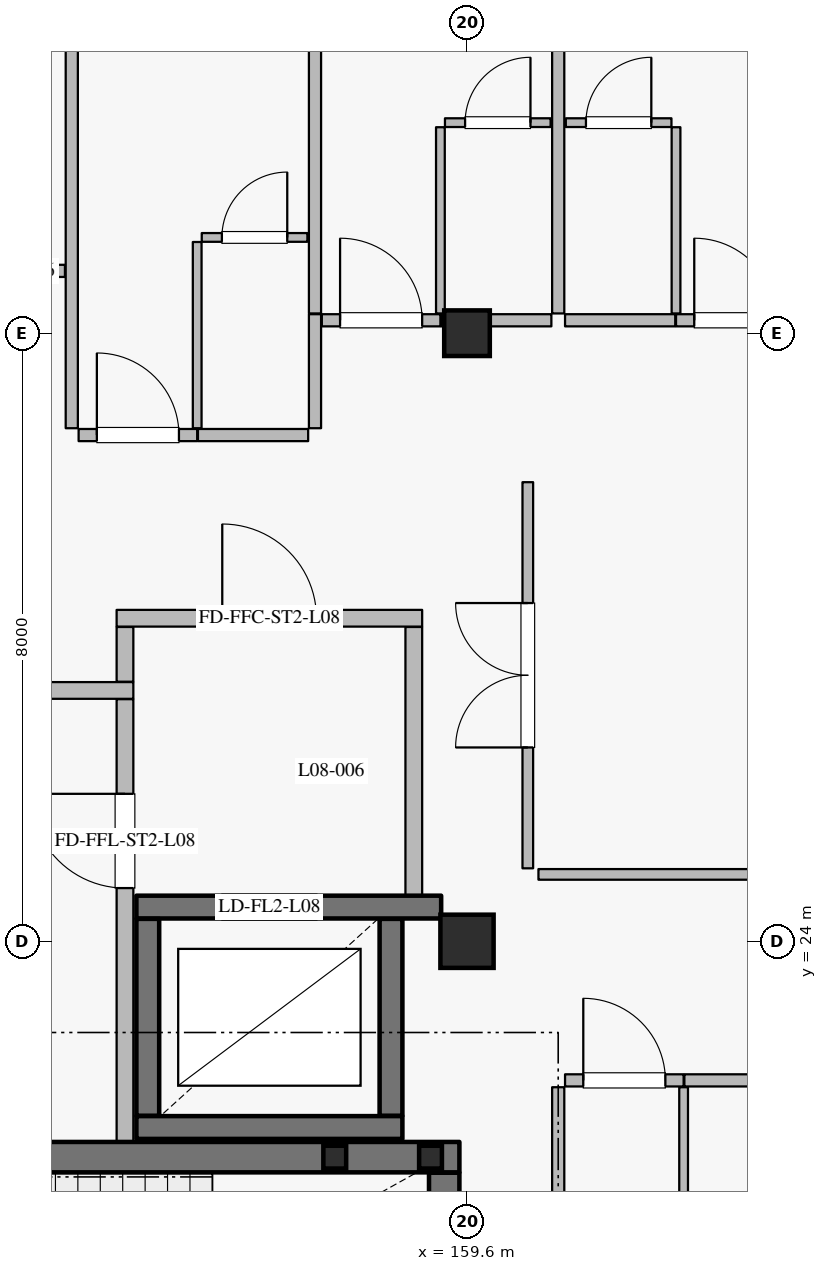
"""IFC4 building model, lengths in metres.
Left out: names, types, materials, properties, quantities, classifications, styles, units other than length and angle.
Written with IfcOpenShell. Run it as: python <this file> out.ifc"""

import sys

from ifc_helpers import new_model, si_unit, direction, frame, frame_2d, origin, origin_2d, place, context, subcontext, project, spatial, rectangle, hollow_rectangle, extrude, element, fill, save


model = new_model("IFC4")
c1 = context("Model", 3, precision=1e-05, world=origin(), true_north=direction((0.0, 1.0)))
c2 = subcontext(c1, "Body", "Model", "MODEL_VIEW")
j1 = project(units=[si_unit("LENGTHUNIT", "METRE"), si_unit("PLANEANGLEUNIT", "RADIAN")], contexts=[c1])
p1 = place(None, origin())
s1 = spatial("IfcSite", under=j1, at=p1, CompositionType="ELEMENT")
p2 = place(p1, origin())
s2 = spatial("IfcBuilding", under=s1, at=p2, CompositionType="ELEMENT")
p3 = place(p2, frame((0.0, 0.0, 36.0)))
s3 = spatial("IfcBuildingStorey", under=s2, at=p3, CompositionType="ELEMENT", Elevation=36.0)
p4 = place(p3, frame((159.6, 24.0, 0.0), z_axis=(0.0, 0.0, 1.0), x_axis=(1.0, 0.0, 0.0)))
e1 = element("IfcColumn", 1, at=p4, inside=s3, PredefinedType="COLUMN", context=c2, shape_type="SweptSolid", body=[
    extrude(rectangle(XDim=0.7, YDim=0.7, at=origin_2d()), origin(), (0.0, 0.0, 1.0), 3.6),
])
p5 = place(p3, frame((159.6, 32.0, 0.0), z_axis=(0.0, 0.0, 1.0), x_axis=(1.0, 0.0, 0.0)))
e2 = element("IfcColumn", 2, at=p5, inside=s3, PredefinedType="COLUMN", context=c2, shape_type="SweptSolid", body=[
    extrude(rectangle(XDim=0.6, YDim=0.6, at=origin_2d()), origin(), (0.0, 0.0, 1.0), 3.6),
])
p6 = place(p3, frame((155.25, 21.55, 0.0), z_axis=(0.0, 0.0, 1.0), x_axis=(1.0, 0.0, 0.0)))
e3 = element("IfcWall", 3, at=p6, inside=s3, PredefinedType="SHEAR", context=c2, shape_type="SweptSolid", body=[
    extrude(rectangle(XDim=3.5, YDim=0.3, at=frame_2d((1.75, 0.0))), origin(), (0.0, 0.0, 1.0), 3.365),
])
p7 = place(p3, frame((158.6, 21.705, 0.0), z_axis=(0.0, 0.0, 1.0), x_axis=(0.0, 1.0, 0.0)))
e4 = element("IfcWall", 4, at=p7, inside=s3, PredefinedType="SHEAR", context=c2, shape_type="SweptSolid", body=[
    extrude(rectangle(XDim=2.59, YDim=0.3, at=frame_2d((1.295, 0.0))), origin(), (0.0, 0.0, 1.0), 3.365),
])
p8 = place(p3, frame((159.26, 24.45, 0.0), z_axis=(0.0, 0.0, 1.0), x_axis=(-1.0, 0.0, 0.0)))
e5 = element("IfcWall", 5, at=p8, inside=s3, PredefinedType="SHEAR", context=c2, shape_type="SweptSolid", body=[
    extrude(rectangle(XDim=4.01, YDim=0.3, at=frame_2d((2.005, 0.0))), origin(), (0.0, 0.0, 1.0), 3.365),
])
p9 = place(p8, frame((1.635, 0.0, 0.0)))
e6 = element("IfcOpeningElement", 6, at=p9, cuts=e5, PredefinedType="OPENING", context=c2, shape_type="SweptSolid", body=[
    extrude(rectangle(XDim=1.25, YDim=2.25, at=frame_2d((0.625, 1.125))), frame((0.0, 0.16, 0.0), z_axis=(0.0, -1.0, 0.0), x_axis=(1.0, 0.0, 0.0)), (0.0, 0.0, 1.0), 0.32),
])
p10 = place(p3, frame((155.4, 24.295, 0.0), z_axis=(0.0, 0.0, 1.0), x_axis=(0.0, -1.0, 0.0)))
e7 = element("IfcWall", 7, at=p10, inside=s3, PredefinedType="SHEAR", context=c2, shape_type="SweptSolid", body=[
    extrude(rectangle(XDim=2.59, YDim=0.3, at=frame_2d((1.295, 0.0))), origin(), (0.0, 0.0, 1.0), 3.365),
])
p11 = place(p3, frame((159.3, 17.005, 0.0), z_axis=(0.0, 0.0, 1.0), x_axis=(0.0, 1.0, 0.0)))
e8 = element("IfcWall", 8, at=p11, inside=s3, PredefinedType="SHEAR", context=c2, shape_type="SweptSolid", body=[
    extrude(rectangle(XDim=3.95, YDim=0.4, at=frame_2d((1.975, 0.0))), origin(), (0.0, 0.0, 1.0), 3.365),
])
p12 = place(p3, frame((151.3, 21.16, 0.0), z_axis=(0.0, 0.0, 1.0), x_axis=(1.0, 0.0, 0.0)))
e9 = element("IfcWall", 9, at=p12, inside=s3, PredefinedType="SHEAR", context=c2, shape_type="SweptSolid", body=[
    extrude(rectangle(XDim=8.2, YDim=0.4, at=frame_2d((4.1, 0.0))), origin(), (0.0, 0.0, 1.0), 3.365),
])
p13 = place(p12, frame((0.43, 0.0, 0.0)))
e10 = element("IfcOpeningElement", 10, at=p13, cuts=e9, PredefinedType="OPENING", context=c2, shape_type="SweptSolid", body=[
    extrude(rectangle(XDim=1.16, YDim=2.2, at=frame_2d((0.58, 1.1))), frame((0.0, 0.21, 0.0), z_axis=(0.0, -1.0, 0.0), x_axis=(1.0, 0.0, 0.0)), (0.0, 0.0, 1.0), 0.42),
])
p14 = place(p3, frame((151.39, 27.3, 0.0), z_axis=(0.0, 0.0, 1.0), x_axis=(1.0, 0.0, 0.0)))
e11 = element("IfcWall", 11, at=p14, inside=s3, PredefinedType="PARTITIONING", context=c2, shape_type="SweptSolid", body=[
    extrude(rectangle(XDim=3.82, YDim=0.22, at=frame_2d((1.91, 0.0))), origin(), (0.0, 0.0, 1.0), 3.365),
])
p15 = place(p14, frame((1.35, 0.0, 0.0)))
e12 = element("IfcOpeningElement", 12, at=p15, cuts=e11, PredefinedType="OPENING", context=c2, shape_type="SweptSolid", body=[
    extrude(rectangle(XDim=1.12, YDim=2.2, at=frame_2d((0.56, 1.1))), frame((0.0, 0.12, 0.0), z_axis=(0.0, -1.0, 0.0), x_axis=(1.0, 0.0, 0.0)), (0.0, 0.0, 1.0), 0.24),
])
p16 = place(p3, frame((155.1, 21.365, 0.0), z_axis=(0.0, 0.0, 1.0), x_axis=(0.0, 1.0, 0.0)))
e13 = element("IfcWall", 13, at=p16, inside=s3, PredefinedType="PARTITIONING", context=c2, shape_type="SweptSolid", body=[
    extrude(rectangle(XDim=5.82, YDim=0.22, at=frame_2d((2.91, 0.0))), origin(), (0.0, 0.0, 1.0), 3.365),
])
p17 = place(p16, frame((3.335, 0.0, 0.0)))
e14 = element("IfcOpeningElement", 14, at=p17, cuts=e13, PredefinedType="OPENING", context=c2, shape_type="SweptSolid", body=[
    extrude(rectangle(XDim=1.24, YDim=2.2, at=frame_2d((0.62, 1.1))), frame((0.0, 0.12, 0.0), z_axis=(0.0, -1.0, 0.0), x_axis=(1.0, 0.0, 0.0)), (0.0, 0.0, 1.0), 0.24),
])
p18 = place(p3, frame((155.1, 27.415, 0.0), z_axis=(0.0, 0.0, 1.0), x_axis=(0.0, 1.0, 0.0)))
e15 = element("IfcWall", 15, at=p18, inside=s3, PredefinedType="PARTITIONING", context=c2, shape_type="SweptSolid", body=[
    extrude(rectangle(XDim=0.72, YDim=0.22, at=frame_2d((0.36, 0.0))), origin(), (0.0, 0.0, 1.0), 3.365),
])
p19 = place(p3, frame((158.9, 24.605, 0.0), z_axis=(0.0, 0.0, 1.0), x_axis=(0.0, 1.0, 0.0)))
e16 = element("IfcWall", 16, at=p19, inside=s3, PredefinedType="PARTITIONING", context=c2, shape_type="SweptSolid", body=[
    extrude(rectangle(XDim=3.53, YDim=0.22, at=frame_2d((1.765, 0.0))), origin(), (0.0, 0.0, 1.0), 3.365),
])
p20 = place(p3, frame((154.99, 28.25, 0.0), z_axis=(0.0, 0.0, 1.0), x_axis=(1.0, 0.0, 0.0)))
e17 = element("IfcWall", 17, at=p20, inside=s3, PredefinedType="PARTITIONING", context=c2, shape_type="SweptSolid", body=[
    extrude(rectangle(XDim=4.02, YDim=0.22, at=frame_2d((2.01, 0.0))), origin(), (0.0, 0.0, 1.0), 3.365),
])
p21 = place(p20, frame((1.39, 0.0, 0.0)))
e18 = element("IfcOpeningElement", 18, at=p21, cuts=e17, PredefinedType="OPENING", context=c2, shape_type="SweptSolid", body=[
    extrude(rectangle(XDim=1.24, YDim=2.2, at=frame_2d((0.62, 1.1))), frame((0.0, 0.12, 0.0), z_axis=(0.0, -1.0, 0.0), x_axis=(1.0, 0.0, 0.0)), (0.0, 0.0, 1.0), 0.24),
])
for number, where, z_axis, x_axis in (
    (19, (157.86, 21.16, -1.8), (0.0, 0.0, 1.0), (1.0, 0.0, 0.0)),
    (20, (159.12, 21.16, -1.8), (0.0, 0.0, 1.0), (1.0, 0.0, 0.0)),
):
    element("IfcColumn", number, at=place(p3, frame(where, z_axis=z_axis, x_axis=x_axis)), inside=s3, PredefinedType="COLUMN", context=c2, shape_type="SweptSolid", body=[
        extrude(hollow_rectangle(XDim=0.3, YDim=0.3, WallThickness=0.012, at=origin_2d()), origin(), (0.0, 0.0, 1.0), 3.42),
    ])
p22 = place(p3, frame((152.75, 32.82, 0.0), z_axis=(0.0, 0.0, 1.0), x_axis=(1.0, 0.0, 0.0)))
e21 = element("IfcWall", 21, at=p22, inside=s3, PredefinedType="PARTITIONING", context=c2, shape_type="SweptSolid", body=[
    extrude(rectangle(XDim=1.56, YDim=0.16, at=frame_2d((0.78, 0.0))), origin(), (0.0, 0.0, 1.0), 3.365),
])
p23 = place(p22, frame((0.24, 0.0, 0.0)))
e22 = element("IfcOpeningElement", 22, at=p23, cuts=e21, PredefinedType="OPENING", context=c2, shape_type="SweptSolid", body=[
    extrude(rectangle(XDim=1.08, YDim=2.3, at=frame_2d((0.54, 1.15))), frame((0.0, 0.09, 0.0), z_axis=(0.0, -1.0, 0.0), x_axis=(1.0, 0.0, 0.0)), (0.0, 0.0, 1.0), 0.18),
])
p24 = place(p3, frame((154.49, 30.66, 0.0), z_axis=(0.0, 0.0, 1.0), x_axis=(1.0, 0.0, 0.0)))
e23 = element("IfcWall", 23, at=p24, inside=s3, PredefinedType="PARTITIONING", context=c2, shape_type="SweptSolid", body=[
    extrude(rectangle(XDim=1.56, YDim=0.16, at=frame_2d((0.78, 0.0))), origin(), (0.0, 0.0, 1.0), 3.365),
])
p25 = place(p24, frame((0.24, 0.0, 0.0)))
e24 = element("IfcOpeningElement", 24, at=p25, cuts=e23, PredefinedType="OPENING", context=c2, shape_type="SweptSolid", body=[
    extrude(rectangle(XDim=1.08, YDim=2.3, at=frame_2d((0.54, 1.15))), frame((0.0, 0.09, 0.0), z_axis=(0.0, -1.0, 0.0), x_axis=(1.0, 0.0, 0.0)), (0.0, 0.0, 1.0), 0.18),
])
p26 = place(p3, frame((156.06, 30.66, 0.0), z_axis=(0.0, 0.0, 1.0), x_axis=(1.0, 0.0, 0.0)))
e25 = element("IfcWall", 25, at=p26, inside=s3, PredefinedType="PARTITIONING", context=c2, shape_type="SweptSolid", body=[
    extrude(rectangle(XDim=1.45, YDim=0.16, at=frame_2d((0.725, 0.0))), origin(), (0.0, 0.0, 1.0), 3.365),
])
p27 = place(p3, frame((156.05, 30.75, 0.0), z_axis=(0.0, 0.0, 1.0), x_axis=(0.0, 1.0, 0.0)))
e26 = element("IfcWall", 26, at=p27, inside=s3, PredefinedType="PARTITIONING", context=c2, shape_type="SweptSolid", body=[
    extrude(rectangle(XDim=2.45, YDim=0.115, at=frame_2d((1.225, 0.0))), origin(), (0.0, 0.0, 1.0), 3.365),
])
p28 = place(p3, frame((156.11, 33.26, 0.0), z_axis=(0.0, 0.0, 1.0), x_axis=(1.0, 0.0, 0.0)))
e27 = element("IfcWall", 27, at=p28, inside=s3, PredefinedType="PARTITIONING", context=c2, shape_type="SweptSolid", body=[
    extrude(rectangle(XDim=1.39, YDim=0.115, at=frame_2d((0.695, 0.0))), origin(), (0.0, 0.0, 1.0), 3.365),
])
p29 = place(p28, frame((0.265, 0.0, 0.0)))
e28 = element("IfcOpeningElement", 28, at=p29, cuts=e27, PredefinedType="OPENING", context=c2, shape_type="SweptSolid", body=[
    extrude(rectangle(XDim=0.86, YDim=2.12, at=frame_2d((0.43, 1.06))), frame((0.0, 0.067, 0.0), z_axis=(0.0, -1.0, 0.0), x_axis=(1.0, 0.0, 0.0)), (0.0, 0.0, 1.0), 0.135),
])
p30 = place(p3, frame((154.4, 30.75, 0.0), z_axis=(0.0, 0.0, 1.0), x_axis=(0.0, 1.0, 0.0)))
e29 = element("IfcWall", 29, at=p30, inside=s3, PredefinedType="PARTITIONING", context=c2, shape_type="SweptSolid", body=[
    extrude(rectangle(XDim=8.91, YDim=0.16, at=frame_2d((4.455, 0.0))), origin(), (0.0, 0.0, 1.0), 3.365),
])
p31 = place(p3, frame((157.6, 30.75, 0.0), z_axis=(0.0, 0.0, 1.0), x_axis=(0.0, 1.0, 0.0)))
e30 = element("IfcWall", 30, at=p31, inside=s3, PredefinedType="PARTITIONING", context=c2, shape_type="SweptSolid", body=[
    extrude(rectangle(XDim=1.5, YDim=0.16, at=frame_2d((0.75, 0.0))), origin(), (0.0, 0.0, 1.0), 3.365),
])
p32 = place(p3, frame((157.69, 32.17, 0.0), z_axis=(0.0, 0.0, 1.0), x_axis=(1.0, 0.0, 0.0)))
e31 = element("IfcWall", 31, at=p32, inside=s3, PredefinedType="PARTITIONING", context=c2, shape_type="SweptSolid", body=[
    extrude(rectangle(XDim=1.56, YDim=0.16, at=frame_2d((0.78, 0.0))), origin(), (0.0, 0.0, 1.0), 2.84),
])
p33 = place(p32, frame((0.24, 0.0, 0.0)))
e32 = element("IfcOpeningElement", 32, at=p33, cuts=e31, PredefinedType="OPENING", context=c2, shape_type="SweptSolid", body=[
    extrude(rectangle(XDim=1.08, YDim=2.3, at=frame_2d((0.54, 1.15))), frame((0.0, 0.09, 0.0), z_axis=(0.0, -1.0, 0.0), x_axis=(1.0, 0.0, 0.0)), (0.0, 0.0, 1.0), 0.18),
])
p34 = place(p3, frame((159.26, 32.17, 0.0), z_axis=(0.0, 0.0, 1.0), x_axis=(1.0, 0.0, 0.0)))
e33 = element("IfcWall", 33, at=p34, inside=s3, PredefinedType="PARTITIONING", context=c2, shape_type="SweptSolid", body=[
    extrude(rectangle(XDim=1.45, YDim=0.16, at=frame_2d((0.725, 0.0))), origin(), (0.0, 0.0, 1.0), 3.365),
])
p35 = place(p3, frame((159.25, 32.26, 0.0), z_axis=(0.0, 0.0, 1.0), x_axis=(0.0, 1.0, 0.0)))
e34 = element("IfcWall", 34, at=p35, inside=s3, PredefinedType="PARTITIONING", context=c2, shape_type="SweptSolid", body=[
    extrude(rectangle(XDim=2.45, YDim=0.115, at=frame_2d((1.225, 0.0))), origin(), (0.0, 0.0, 1.0), 3.365),
])
p36 = place(p3, frame((159.31, 34.77, 0.0), z_axis=(0.0, 0.0, 1.0), x_axis=(1.0, 0.0, 0.0)))
e35 = element("IfcWall", 35, at=p36, inside=s3, PredefinedType="PARTITIONING", context=c2, shape_type="SweptSolid", body=[
    extrude(rectangle(XDim=1.39, YDim=0.115, at=frame_2d((0.695, 0.0))), origin(), (0.0, 0.0, 1.0), 3.365),
])
p37 = place(p36, frame((0.265, 0.0, 0.0)))
e36 = element("IfcOpeningElement", 36, at=p37, cuts=e35, PredefinedType="OPENING", context=c2, shape_type="SweptSolid", body=[
    extrude(rectangle(XDim=0.86, YDim=2.12, at=frame_2d((0.43, 1.06))), frame((0.0, 0.067, 0.0), z_axis=(0.0, -1.0, 0.0), x_axis=(1.0, 0.0, 0.0)), (0.0, 0.0, 1.0), 0.135),
])
p38 = place(p3, frame((157.6, 32.26, 0.0), z_axis=(0.0, 0.0, 1.0), x_axis=(0.0, 1.0, 0.0)))
e37 = element("IfcWall", 37, at=p38, inside=s3, PredefinedType="PARTITIONING", context=c2, shape_type="SweptSolid", body=[
    extrude(rectangle(XDim=7.4, YDim=0.16, at=frame_2d((3.7, 0.0))), origin(), (0.0, 0.0, 1.0), 3.365),
])
p39 = place(p3, frame((160.89, 32.17, 0.0), z_axis=(0.0, 0.0, 1.0), x_axis=(1.0, 0.0, 0.0)))
e38 = element("IfcWall", 38, at=p39, inside=s3, PredefinedType="PARTITIONING", context=c2, shape_type="SweptSolid", body=[
    extrude(rectangle(XDim=1.45, YDim=0.16, at=frame_2d((0.725, 0.0))), origin(), (0.0, 0.0, 1.0), 3.365),
])
p40 = place(p3, frame((162.35, 32.17, 0.0), z_axis=(0.0, 0.0, 1.0), x_axis=(1.0, 0.0, 0.0)))
e39 = element("IfcWall", 39, at=p40, inside=s3, PredefinedType="PARTITIONING", context=c2, shape_type="SweptSolid", body=[
    extrude(rectangle(XDim=1.56, YDim=0.16, at=frame_2d((0.78, 0.0))), origin(), (0.0, 0.0, 1.0), 3.365),
])
p41 = place(p40, frame((0.24, 0.0, 0.0)))
e40 = element("IfcOpeningElement", 40, at=p41, cuts=e39, PredefinedType="OPENING", context=c2, shape_type="SweptSolid", body=[
    extrude(rectangle(XDim=1.08, YDim=2.3, at=frame_2d((0.54, 1.15))), frame((0.0, 0.09, 0.0), z_axis=(0.0, -1.0, 0.0), x_axis=(1.0, 0.0, 0.0)), (0.0, 0.0, 1.0), 0.18),
])
p42 = place(p3, frame((162.35, 32.26, 0.0), z_axis=(0.0, 0.0, 1.0), x_axis=(0.0, 1.0, 0.0)))
e41 = element("IfcWall", 41, at=p42, inside=s3, PredefinedType="PARTITIONING", context=c2, shape_type="SweptSolid", body=[
    extrude(rectangle(XDim=2.45, YDim=0.115, at=frame_2d((1.225, 0.0))), origin(), (0.0, 0.0, 1.0), 3.365),
])
p43 = place(p3, frame((160.9, 34.77, 0.0), z_axis=(0.0, 0.0, 1.0), x_axis=(1.0, 0.0, 0.0)))
e42 = element("IfcWall", 42, at=p43, inside=s3, PredefinedType="PARTITIONING", context=c2, shape_type="SweptSolid", body=[
    extrude(rectangle(XDim=1.39, YDim=0.115, at=frame_2d((0.695, 0.0))), origin(), (0.0, 0.0, 1.0), 3.365),
])
p44 = place(p43, frame((0.265, 0.0, 0.0)))
e43 = element("IfcOpeningElement", 43, at=p44, cuts=e42, PredefinedType="OPENING", context=c2, shape_type="SweptSolid", body=[
    extrude(rectangle(XDim=0.86, YDim=2.12, at=frame_2d((0.43, 1.06))), frame((0.0, 0.067, 0.0), z_axis=(0.0, -1.0, 0.0), x_axis=(1.0, 0.0, 0.0)), (0.0, 0.0, 1.0), 0.135),
])
p45 = place(p3, frame((160.8, 32.26, 0.0), z_axis=(0.0, 0.0, 1.0), x_axis=(0.0, 1.0, 0.0)))
e44 = element("IfcWall", 44, at=p45, inside=s3, PredefinedType="PARTITIONING", context=c2, shape_type="SweptSolid", body=[
    extrude(rectangle(XDim=8.54, YDim=0.16, at=frame_2d((4.27, 0.0))), origin(), (0.0, 0.0, 1.0), 3.365),
])
p46 = place(p3, frame((160.89, 22.17, 0.0), z_axis=(0.0, 0.0, 1.0), x_axis=(1.0, 0.0, 0.0)))
e45 = element("IfcWall", 45, at=p46, inside=s3, PredefinedType="PARTITIONING", context=c2, shape_type="SweptSolid", body=[
    extrude(rectangle(XDim=1.56, YDim=0.16, at=frame_2d((0.78, 0.0))), origin(), (0.0, 0.0, 1.0), 3.365),
])
p47 = place(p46, frame((0.24, 0.0, 0.0)))
e46 = element("IfcOpeningElement", 46, at=p47, cuts=e45, PredefinedType="OPENING", context=c2, shape_type="SweptSolid", body=[
    extrude(rectangle(XDim=1.08, YDim=2.3, at=frame_2d((0.54, 1.15))), frame((0.0, 0.09, 0.0), z_axis=(0.0, -1.0, 0.0), x_axis=(1.0, 0.0, 0.0)), (0.0, 0.0, 1.0), 0.18),
])
p48 = place(p3, frame((162.46, 22.17, 0.0), z_axis=(0.0, 0.0, 1.0), x_axis=(1.0, 0.0, 0.0)))
e47 = element("IfcWall", 47, at=p48, inside=s3, PredefinedType="PARTITIONING", context=c2, shape_type="SweptSolid", body=[
    extrude(rectangle(XDim=1.45, YDim=0.16, at=frame_2d((0.725, 0.0))), origin(), (0.0, 0.0, 1.0), 3.365),
])
p49 = place(p3, frame((162.45, 19.63, 0.0), z_axis=(0.0, 0.0, 1.0), x_axis=(0.0, 1.0, 0.0)))
e48 = element("IfcWall", 48, at=p49, inside=s3, PredefinedType="PARTITIONING", context=c2, shape_type="SweptSolid", body=[
    extrude(rectangle(XDim=2.45, YDim=0.115, at=frame_2d((1.225, 0.0))), origin(), (0.0, 0.0, 1.0), 3.365),
])
p50 = place(p3, frame((160.8, 12.53, 0.0), z_axis=(0.0, 0.0, 1.0), x_axis=(0.0, 1.0, 0.0)))
e49 = element("IfcWall", 49, at=p50, inside=s3, PredefinedType="PARTITIONING", context=c2, shape_type="SweptSolid", body=[
    extrude(rectangle(XDim=9.55, YDim=0.16, at=frame_2d((4.775, 0.0))), origin(), (0.0, 0.0, 1.0), 3.365),
])
p51 = place(p3, frame((160.4, 24.96, 0.0), z_axis=(0.0, 0.0, 1.0), x_axis=(0.0, 1.0, 0.0)))
e50 = element("IfcWall", 50, at=p51, inside=s3, PredefinedType="PARTITIONING", context=c2, shape_type="SweptSolid", body=[
    extrude(rectangle(XDim=5.08, YDim=0.14, at=frame_2d((2.54, 0.0))), origin(), (0.0, 0.0, 1.0), 3.365),
])
p52 = place(p51, frame((1.59, 0.0, 0.0)))
e51 = element("IfcOpeningElement", 51, at=p52, cuts=e50, PredefinedType="OPENING", context=c2, shape_type="SweptSolid", body=[
    extrude(rectangle(XDim=1.9, YDim=2.4, at=frame_2d((0.95, 1.2))), frame((0.0, 0.08, 0.0), z_axis=(0.0, -1.0, 0.0), x_axis=(1.0, 0.0, 0.0)), (0.0, 0.0, 1.0), 0.16),
])
p53 = place(p3, frame((160.54, 24.88, 0.0), z_axis=(0.0, 0.0, 1.0), x_axis=(1.0, 0.0, 0.0)))
e52 = element("IfcWall", 52, at=p53, inside=s3, PredefinedType="PARTITIONING", context=c2, shape_type="SweptSolid", body=[
    extrude(rectangle(XDim=6.41, YDim=0.14, at=frame_2d((3.205, 0.0))), origin(), (0.0, 0.0, 1.0), 3.365),
])
p54 = place(p9, origin())
e53 = element("IfcDoor", 53, at=p54, inside=s3, OperationType="DOUBLE_DOOR_SLIDING", PredefinedType="DOOR", context=c2, shape_type="SweptSolid", body=[
    extrude(rectangle(XDim=1.25, YDim=2.25, at=frame_2d((0.625, 1.125))), frame((0.0, 0.025, 0.0), z_axis=(0.0, -1.0, 0.0), x_axis=(1.0, 0.0, 0.0)), (0.0, 0.0, 1.0), 0.05),
])
fill(e6, e53)
p55 = place(p17, origin())
e54 = element("IfcDoor", 54, at=p55, inside=s3, OperationType="SINGLE_SWING_RIGHT", PredefinedType="DOOR", context=c2, shape_type="SweptSolid", body=[
    extrude(rectangle(XDim=1.24, YDim=2.2, at=frame_2d((0.62, 1.1))), frame((0.0, 0.025, 0.0), z_axis=(0.0, -1.0, 0.0), x_axis=(1.0, 0.0, 0.0)), (0.0, 0.0, 1.0), 0.05),
])
fill(e14, e54)
p56 = place(p21, origin())
e55 = element("IfcDoor", 55, at=p56, inside=s3, OperationType="SINGLE_SWING_LEFT", PredefinedType="DOOR", context=c2, shape_type="SweptSolid", body=[
    extrude(rectangle(XDim=1.24, YDim=2.2, at=frame_2d((0.62, 1.1))), frame((0.0, 0.025, 0.0), z_axis=(0.0, -1.0, 0.0), x_axis=(1.0, 0.0, 0.0)), (0.0, 0.0, 1.0), 0.05),
])
fill(e18, e55)
p57 = place(p25, origin())
e56 = element("IfcDoor", 56, at=p57, inside=s3, OperationType="SINGLE_SWING_LEFT", PredefinedType="DOOR", context=c2, shape_type="SweptSolid", body=[
    extrude(rectangle(XDim=1.08, YDim=2.3, at=frame_2d((0.54, 1.15))), frame((0.0, 0.025, 0.0), z_axis=(0.0, -1.0, 0.0), x_axis=(1.0, 0.0, 0.0)), (0.0, 0.0, 1.0), 0.05),
])
fill(e24, e56)
p58 = place(p29, origin())
e57 = element("IfcDoor", 57, at=p58, inside=s3, OperationType="SINGLE_SWING_RIGHT", PredefinedType="DOOR", context=c2, shape_type="SweptSolid", body=[
    extrude(rectangle(XDim=0.86, YDim=2.12, at=frame_2d((0.43, 1.06))), frame((0.0, 0.025, 0.0), z_axis=(0.0, -1.0, 0.0), x_axis=(1.0, 0.0, 0.0)), (0.0, 0.0, 1.0), 0.05),
])
fill(e28, e57)
p59 = place(p33, origin())
e58 = element("IfcDoor", 58, at=p59, inside=s3, OperationType="SINGLE_SWING_LEFT", PredefinedType="DOOR", context=c2, shape_type="SweptSolid", body=[
    extrude(rectangle(XDim=1.08, YDim=2.3, at=frame_2d((0.54, 1.15))), frame((0.0, 0.025, 0.0), z_axis=(0.0, -1.0, 0.0), x_axis=(1.0, 0.0, 0.0)), (0.0, 0.0, 1.0), 0.05),
])
fill(e32, e58)
p60 = place(p37, origin())
e59 = element("IfcDoor", 59, at=p60, inside=s3, OperationType="SINGLE_SWING_RIGHT", PredefinedType="DOOR", context=c2, shape_type="SweptSolid", body=[
    extrude(rectangle(XDim=0.86, YDim=2.12, at=frame_2d((0.43, 1.06))), frame((0.0, 0.025, 0.0), z_axis=(0.0, -1.0, 0.0), x_axis=(1.0, 0.0, 0.0)), (0.0, 0.0, 1.0), 0.05),
])
fill(e36, e59)
p61 = place(p41, origin())
e60 = element("IfcDoor", 60, at=p61, inside=s3, OperationType="SINGLE_SWING_LEFT", PredefinedType="DOOR", context=c2, shape_type="SweptSolid", body=[
    extrude(rectangle(XDim=1.08, YDim=2.3, at=frame_2d((0.54, 1.15))), frame((0.0, 0.025, 0.0), z_axis=(0.0, -1.0, 0.0), x_axis=(1.0, 0.0, 0.0)), (0.0, 0.0, 1.0), 0.05),
])
fill(e40, e60)
p62 = place(p44, origin())
e61 = element("IfcDoor", 61, at=p62, inside=s3, OperationType="SINGLE_SWING_RIGHT", PredefinedType="DOOR", context=c2, shape_type="SweptSolid", body=[
    extrude(rectangle(XDim=0.86, YDim=2.12, at=frame_2d((0.43, 1.06))), frame((0.0, 0.025, 0.0), z_axis=(0.0, -1.0, 0.0), x_axis=(1.0, 0.0, 0.0)), (0.0, 0.0, 1.0), 0.05),
])
fill(e43, e61)
p63 = place(p47, origin())
e62 = element("IfcDoor", 62, at=p63, inside=s3, OperationType="SINGLE_SWING_LEFT", PredefinedType="DOOR", context=c2, shape_type="SweptSolid", body=[
    extrude(rectangle(XDim=1.08, YDim=2.3, at=frame_2d((0.54, 1.15))), frame((0.0, 0.025, 0.0), z_axis=(0.0, -1.0, 0.0), x_axis=(1.0, 0.0, 0.0)), (0.0, 0.0, 1.0), 0.05),
])
fill(e46, e62)
p64 = place(p52, origin())
e63 = element("IfcDoor", 63, at=p64, inside=s3, OperationType="DOUBLE_DOOR_SINGLE_SWING", PredefinedType="DOOR", context=c2, shape_type="SweptSolid", body=[
    extrude(rectangle(XDim=1.9, YDim=2.4, at=frame_2d((0.95, 1.2))), frame((0.0, 0.025, 0.0), z_axis=(0.0, -1.0, 0.0), x_axis=(1.0, 0.0, 0.0)), (0.0, 0.0, 1.0), 0.05),
])
fill(e51, e63)
save(model, sys.argv[1])
